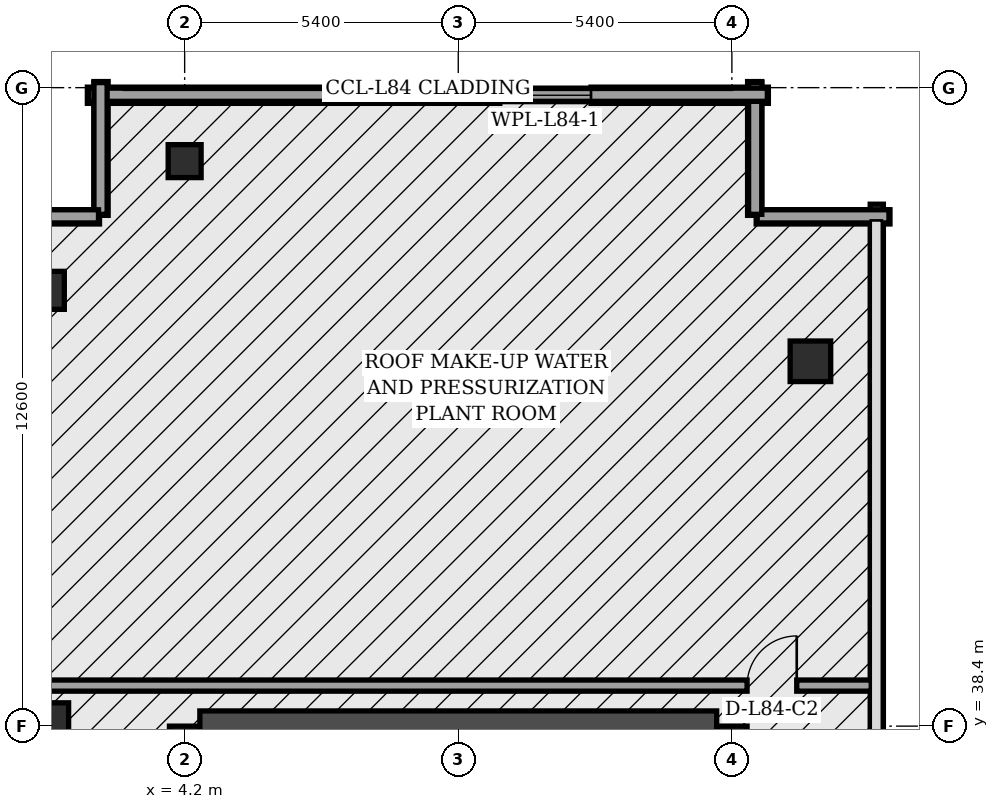
"""IFC4 building model, lengths in metres.
Left out: names, types, materials, properties, quantities, classifications, styles, units other than length and angle.
Written with IfcOpenShell. Run it as: python <this file> out.ifc"""

import sys

from ifc_helpers import new_model, si_unit, direction, frame, frame_2d, origin, origin_2d, place, context, subcontext, project, spatial, rectangle, hollow_rectangle, extrude, element, fill, save


model = new_model("IFC4")
c1 = context("Model", 3, precision=1e-05, world=origin(), true_north=direction((0.0, 1.0)))
c2 = subcontext(c1, "Body", "Model", "MODEL_VIEW")
j1 = project(units=[si_unit("LENGTHUNIT", "METRE"), si_unit("PLANEANGLEUNIT", "RADIAN")], contexts=[c1])
p1 = place(None, origin())
s1 = spatial("IfcSite", under=j1, at=p1, CompositionType="ELEMENT")
p2 = place(p1, origin())
s2 = spatial("IfcBuilding", under=s1, at=p2, CompositionType="ELEMENT")
p3 = place(p2, frame((0.0, 0.0, 345.5)))
s3 = spatial("IfcBuildingStorey", under=s2, at=p3, CompositionType="ELEMENT", Elevation=345.5)
p4 = place(p3, frame((4.2, 16.8, 0.0), z_axis=(0.0, 0.0, 1.0), x_axis=(0.0, 1.0, 0.0)))
e1 = element("IfcWall", 1, at=p4, inside=s3, PredefinedType="SHEAR", context=c2, shape_type="SweptSolid", body=[
    extrude(rectangle(XDim=21.6, YDim=0.6, at=frame_2d((10.8, 0.0))), origin(), (0.0, 0.0, 1.0), 4.75),
])
p5 = place(p3, frame((15.0, 16.8, 0.0), z_axis=(0.0, 0.0, 1.0), x_axis=(0.0, 1.0, 0.0)))
e2 = element("IfcWall", 2, at=p5, inside=s3, PredefinedType="SHEAR", context=c2, shape_type="SweptSolid", body=[
    extrude(rectangle(XDim=21.6, YDim=0.6, at=frame_2d((10.8, 0.0))), origin(), (0.0, 0.0, 1.0), 4.75),
])
p6 = place(p5, frame((8.65, 0.0, 0.0)))
e3 = element("IfcOpeningElement", 3, at=p6, cuts=e2, PredefinedType="OPENING", context=c2, shape_type="SweptSolid", body=[
    extrude(rectangle(XDim=1.1, YDim=2.2, at=frame_2d((0.55, 1.1))), frame((0.0, 0.31, 0.0), z_axis=(0.0, -1.0, 0.0), x_axis=(1.0, 0.0, 0.0)), (0.0, 0.0, 1.0), 0.62),
])
p7 = place(p3, frame((4.5, 38.4, 0.0), z_axis=(0.0, 0.0, 1.0), x_axis=(1.0, 0.0, 0.0)))
e4 = element("IfcWall", 4, at=p7, inside=s3, PredefinedType="SHEAR", context=c2, shape_type="SweptSolid", body=[
    extrude(rectangle(XDim=10.2, YDim=0.6, at=frame_2d((5.1, 0.0))), origin(), (0.0, 0.0, 1.0), 4.75),
])
p8 = place(p3, frame((1.45, 38.4, 0.0), z_axis=(0.0, 0.0, 1.0), x_axis=(1.0, 0.0, 0.0)))
e5 = element("IfcColumn", 5, at=p8, inside=s3, PredefinedType="COLUMN", context=c2, shape_type="SweptSolid", body=[
    extrude(rectangle(XDim=0.92, YDim=0.92, at=origin_2d()), origin(), (0.0, 0.0, 1.0), 4.75),
])
p9 = place(p3, frame((1.45, 47.0, 0.0), z_axis=(0.0, 0.0, 1.0), x_axis=(1.0, 0.0, 0.0)))
e6 = element("IfcColumn", 6, at=p9, inside=s3, PredefinedType="COLUMN", context=c2, shape_type="SweptSolid", body=[
    extrude(hollow_rectangle(XDim=0.75, YDim=0.75, WallThickness=0.032, at=origin_2d()), origin(), (0.0, 0.0, 1.0), 4.75),
])
p10 = place(p3, frame((4.2, 49.55, 0.0), z_axis=(0.0, 0.0, 1.0), x_axis=(1.0, 0.0, 0.0)))
e7 = element("IfcColumn", 7, at=p10, inside=s3, PredefinedType="COLUMN", context=c2, shape_type="SweptSolid", body=[
    extrude(hollow_rectangle(XDim=0.65, YDim=0.65, WallThickness=0.028, at=origin_2d()), origin(), (0.0, 0.0, 1.0), 4.75),
])
p11 = place(p3, frame((16.55, 45.6, 0.0), z_axis=(0.0, 0.0, 1.0), x_axis=(1.0, 0.0, 0.0)))
e8 = element("IfcColumn", 8, at=p11, inside=s3, PredefinedType="COLUMN", context=c2, shape_type="SweptSolid", body=[
    extrude(rectangle(XDim=0.8, YDim=0.8, at=origin_2d()), origin(), (0.0, 0.0, 1.0), 4.75),
])
for number, where, z_axis, x_axis in (
    (9, (18.12, 48.45, 0.0), (0.0, 0.0, 1.0), (-1.0, 0.0, 0.0)),
    (10, (15.45, 48.48, 0.0), (0.0, 0.0, 1.0), (0.0, 1.0, 0.0)),
):
    element("IfcWall", number, at=place(p3, frame(where, z_axis=z_axis, x_axis=x_axis)), inside=s3, PredefinedType="SOLIDWALL", context=c2, shape_type="SweptSolid", body=[
        extrude(rectangle(XDim=2.64, YDim=0.28, at=frame_2d((1.32, 0.0))), origin(), (0.0, 0.0, 1.0), 4.75),
    ])
p12 = place(p3, frame((15.72, 50.85, 0.0), z_axis=(0.0, 0.0, 1.0), x_axis=(-1.0, 0.0, 0.0)))
e11 = element("IfcWall", 11, at=p12, inside=s3, PredefinedType="SOLIDWALL", context=c2, shape_type="SweptSolid", body=[
    extrude(rectangle(XDim=13.44, YDim=0.32, at=frame_2d((6.72, 0.0))), origin(), (0.0, 0.0, 1.0), 4.75),
])
p13 = place(p12, frame((3.5, 0.0, 1.1)))
e12 = element("IfcOpeningElement", 12, at=p13, cuts=e11, PredefinedType="OPENING", context=c2, shape_type="SweptSolid", body=[
    extrude(rectangle(XDim=1.8, YDim=1.5, at=frame_2d((0.9, 0.75))), frame((0.0, 0.17, 0.0), z_axis=(0.0, -1.0, 0.0), x_axis=(1.0, 0.0, 0.0)), (0.0, 0.0, 1.0), 0.34),
])
for number, where, z_axis, x_axis in (
    (13, (2.55, 51.12, 0.0), (0.0, 0.0, 1.0), (0.0, -1.0, 0.0)),
    (14, (2.52, 48.45, 0.0), (0.0, 0.0, 1.0), (-1.0, 0.0, 0.0)),
):
    element("IfcWall", number, at=place(p3, frame(where, z_axis=z_axis, x_axis=x_axis)), inside=s3, PredefinedType="SOLIDWALL", context=c2, shape_type="SweptSolid", body=[
        extrude(rectangle(XDim=2.64, YDim=0.28, at=frame_2d((1.32, 0.0))), origin(), (0.0, 0.0, 1.0), 4.75),
    ])
p14 = place(p3, frame((17.86, 2.3, 5.0), z_axis=(0.0, 0.0, 1.0), x_axis=(0.0, 1.0, 0.0)))
e15 = element("IfcWall", 15, at=p14, inside=s3, PredefinedType="PARAPET", context=c2, shape_type="SweptSolid", body=[
    extrude(rectangle(XDim=46.4, YDim=0.26, at=frame_2d((23.2, 0.0))), origin(), (0.0, 0.0, 1.0), 1.55),
])
for number, where, z_axis, x_axis in (
    (16, (18.1, 48.46, 5.0), (0.0, 0.0, 1.0), (-1.0, 0.0, 0.0)),
    (17, (15.46, 48.5, 5.0), (0.0, 0.0, 1.0), (0.0, 1.0, 0.0)),
):
    element("IfcWall", number, at=place(p3, frame(where, z_axis=z_axis, x_axis=x_axis)), inside=s3, PredefinedType="PARAPET", context=c2, shape_type="SweptSolid", body=[
        extrude(rectangle(XDim=2.6, YDim=0.26, at=frame_2d((1.3, 0.0))), origin(), (0.0, 0.0, 1.0), 1.55),
    ])
p15 = place(p3, frame((15.7, 50.86, 5.0), z_axis=(0.0, 0.0, 1.0), x_axis=(-1.0, 0.0, 0.0)))
e18 = element("IfcWall", 18, at=p15, inside=s3, PredefinedType="PARAPET", context=c2, shape_type="SweptSolid", body=[
    extrude(rectangle(XDim=13.4, YDim=0.26, at=frame_2d((6.7, 0.0))), origin(), (0.0, 0.0, 1.0), 1.55),
])
for number, where, z_axis, x_axis in (
    (19, (2.54, 51.1, 5.0), (0.0, 0.0, 1.0), (0.0, -1.0, 0.0)),
    (20, (2.5, 48.46, 5.0), (0.0, 0.0, 1.0), (-1.0, 0.0, 0.0)),
):
    element("IfcWall", number, at=place(p3, frame(where, z_axis=z_axis, x_axis=x_axis)), inside=s3, PredefinedType="PARAPET", context=c2, shape_type="SweptSolid", body=[
        extrude(rectangle(XDim=2.6, YDim=0.26, at=frame_2d((1.3, 0.0))), origin(), (0.0, 0.0, 1.0), 1.55),
    ])
p16 = place(p3, frame((0.08, 39.2, 0.0), z_axis=(0.0, 0.0, 1.0), x_axis=(1.0, 0.0, 0.0)))
e21 = element("IfcWall", 21, at=p16, inside=s3, PredefinedType="SOLIDWALL", context=c2, shape_type="SweptSolid", body=[
    extrude(rectangle(XDim=17.67, YDim=0.22, at=frame_2d((8.835, 0.0))), origin(), (0.0, 0.0, 1.0), 4.03),
])
p17 = place(p16, frame((15.22, 0.0, 0.0)))
e22 = element("IfcOpeningElement", 22, at=p17, cuts=e21, PredefinedType="OPENING", context=c2, shape_type="SweptSolid", body=[
    extrude(rectangle(XDim=0.98, YDim=2.15, at=frame_2d((0.49, 1.075))), frame((0.0, 0.12, 0.0), z_axis=(0.0, -1.0, 0.0), x_axis=(1.0, 0.0, 0.0)), (0.0, 0.0, 1.0), 0.24),
])
p18 = place(p13, origin())
e23 = element("IfcWindow", 23, at=p18, inside=s3, PartitioningType="SINGLE_PANEL", PredefinedType="WINDOW", context=c2, shape_type="SweptSolid", body=[
    extrude(rectangle(XDim=1.8, YDim=1.5, at=frame_2d((0.9, 0.75))), frame((0.0, 0.03, 0.0), z_axis=(0.0, -1.0, 0.0), x_axis=(1.0, 0.0, 0.0)), (0.0, 0.0, 1.0), 0.06),
])
fill(e12, e23)
p19 = place(p17, origin())
e24 = element("IfcDoor", 24, at=p19, inside=s3, OperationType="SINGLE_SWING_RIGHT", PredefinedType="DOOR", context=c2, shape_type="SweptSolid", body=[
    extrude(rectangle(XDim=0.98, YDim=2.15, at=frame_2d((0.49, 1.075))), frame((0.0, 0.025, 0.0), z_axis=(0.0, -1.0, 0.0), x_axis=(1.0, 0.0, 0.0)), (0.0, 0.0, 1.0), 0.05),
])
fill(e22, e24)
save(model, sys.argv[1])
